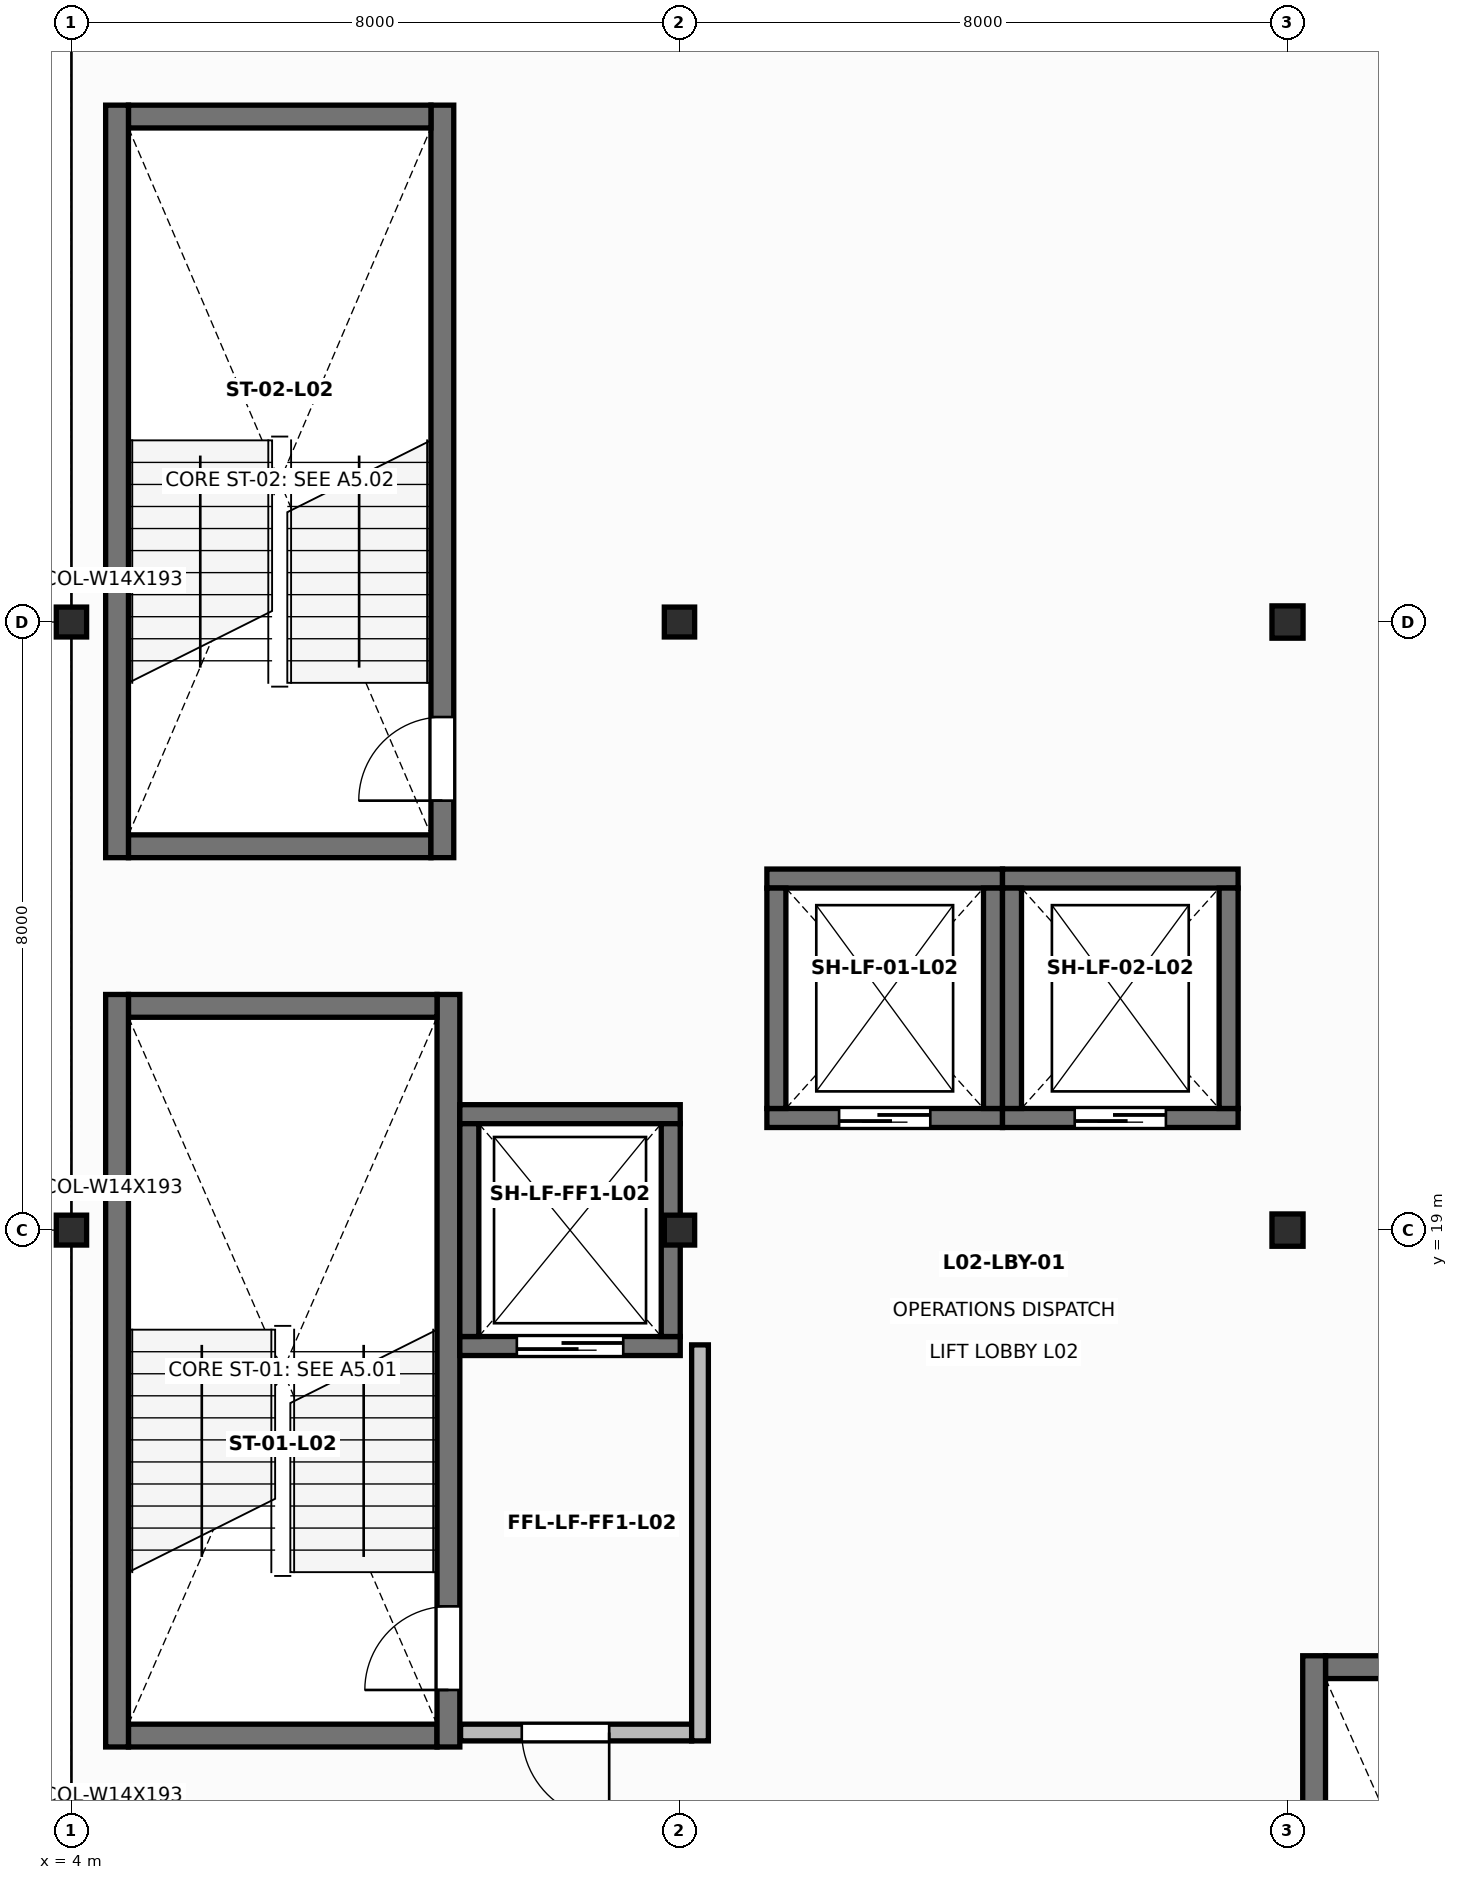
"""IFC4 building model, lengths in metres.
Left out: names, types, materials, properties, quantities, classifications, styles, units other than length and angle.
Written with IfcOpenShell. Run it as: python <this file> out.ifc"""

import sys

from ifc_helpers import new_model, si_unit, direction, frame, frame_2d, origin, origin_2d, place, context, subcontext, project, spatial, rectangle, i_section, extrude, element, fill, save


model = new_model("IFC4")
c1 = context("Model", 3, precision=1e-05, world=origin(), true_north=direction((0.0, 1.0)))
c2 = subcontext(c1, "Body", "Model", "MODEL_VIEW")
j1 = project(units=[si_unit("LENGTHUNIT", "METRE"), si_unit("PLANEANGLEUNIT", "RADIAN")], contexts=[c1])
p1 = place(None, origin())
s1 = spatial("IfcSite", under=j1, at=p1, CompositionType="ELEMENT")
p2 = place(p1, origin())
s2 = spatial("IfcBuilding", under=s1, at=p2, CompositionType="ELEMENT")
p3 = place(p2, frame((0.0, 0.0, 11.2)))
s3 = spatial("IfcBuildingStorey", under=s2, at=p3, CompositionType="ELEMENT", Elevation=11.2)
for number, where, z_axis, x_axis in (
    (1, (4.0, 19.0, 0.0), (0.0, 0.0, 1.0), (1.0, 0.0, 0.0)),
    (2, (4.0, 27.0, 0.0), (0.0, 0.0, 1.0), (1.0, 0.0, 0.0)),
    (3, (12.0, 19.0, 0.0), (0.0, 0.0, 1.0), (1.0, 0.0, 0.0)),
    (4, (12.0, 27.0, 0.0), (0.0, 0.0, 1.0), (1.0, 0.0, 0.0)),
):
    element("IfcColumn", number, at=place(p3, frame(where, z_axis=z_axis, x_axis=x_axis)), inside=s3, PredefinedType="COLUMN", context=c2, shape_type="SweptSolid", body=[
        extrude(i_section(OverallWidth=0.399, OverallDepth=0.393, WebThickness=0.023, FlangeThickness=0.037, at=origin_2d()), origin(), (0.0, 0.0, 1.0), 4.4),
    ])
for number, where, z_axis, x_axis in (
    (5, (20.0, 19.0, 0.0), (0.0, 0.0, 1.0), (1.0, 0.0, 0.0)),
    (6, (20.0, 27.0, 0.0), (0.0, 0.0, 1.0), (1.0, 0.0, 0.0)),
):
    element("IfcColumn", number, at=place(p3, frame(where, z_axis=z_axis, x_axis=x_axis)), inside=s3, PredefinedType="COLUMN", context=c2, shape_type="SweptSolid", body=[
        extrude(i_section(OverallWidth=0.409, OverallDepth=0.425, WebThickness=0.033, FlangeThickness=0.052, at=origin_2d()), origin(), (0.0, 0.0, 1.0), 4.4),
    ])
p4 = place(p3, frame((4.75, 12.35, 0.0), z_axis=(0.0, 0.0, 1.0), x_axis=(1.0, 0.0, 0.0)))
e7 = element("IfcWall", 7, at=p4, inside=s3, PredefinedType="SHEAR", context=c2, shape_type="SweptSolid", body=[
    extrude(rectangle(XDim=4.06, YDim=0.3, at=frame_2d((2.03, 0.0))), origin(), (0.0, 0.0, 1.0), 4.165),
])
p5 = place(p3, frame((8.96, 12.2, 0.0), z_axis=(0.0, 0.0, 1.0), x_axis=(0.0, 1.0, 0.0)))
e8 = element("IfcWall", 8, at=p5, inside=s3, PredefinedType="SHEAR", context=c2, shape_type="SweptSolid", body=[
    extrude(rectangle(XDim=9.9, YDim=0.3, at=frame_2d((4.95, 0.0))), origin(), (0.0, 0.0, 1.0), 4.165),
])
p6 = place(p5, frame((0.75, 0.0, 0.0)))
e9 = element("IfcOpeningElement", 9, at=p6, cuts=e8, PredefinedType="OPENING", context=c2, shape_type="SweptSolid", body=[
    extrude(rectangle(XDim=1.1, YDim=2.15, at=frame_2d((0.55, 1.075))), frame((0.0, 0.16, 0.0), z_axis=(0.0, -1.0, 0.0), x_axis=(1.0, 0.0, 0.0)), (0.0, 0.0, 1.0), 0.32),
])
p7 = place(p3, frame((8.81, 21.95, 0.0), z_axis=(0.0, 0.0, 1.0), x_axis=(-1.0, 0.0, 0.0)))
e10 = element("IfcWall", 10, at=p7, inside=s3, PredefinedType="SHEAR", context=c2, shape_type="SweptSolid", body=[
    extrude(rectangle(XDim=4.06, YDim=0.3, at=frame_2d((2.03, 0.0))), origin(), (0.0, 0.0, 1.0), 4.165),
])
p8 = place(p3, frame((4.6, 22.1, 0.0), z_axis=(0.0, 0.0, 1.0), x_axis=(0.0, -1.0, 0.0)))
e11 = element("IfcWall", 11, at=p8, inside=s3, PredefinedType="SHEAR", context=c2, shape_type="SweptSolid", body=[
    extrude(rectangle(XDim=9.9, YDim=0.3, at=frame_2d((4.95, 0.0))), origin(), (0.0, 0.0, 1.0), 4.165),
])
p9 = place(p3, frame((4.75, 24.05, 0.0), z_axis=(0.0, 0.0, 1.0), x_axis=(1.0, 0.0, 0.0)))
e12 = element("IfcWall", 12, at=p9, inside=s3, PredefinedType="SHEAR", context=c2, shape_type="SweptSolid", body=[
    extrude(rectangle(XDim=3.98, YDim=0.3, at=frame_2d((1.99, 0.0))), origin(), (0.0, 0.0, 1.0), 4.165),
])
p10 = place(p3, frame((8.88, 23.9, 0.0), z_axis=(0.0, 0.0, 1.0), x_axis=(0.0, 1.0, 0.0)))
e13 = element("IfcWall", 13, at=p10, inside=s3, PredefinedType="SHEAR", context=c2, shape_type="SweptSolid", body=[
    extrude(rectangle(XDim=9.9, YDim=0.3, at=frame_2d((4.95, 0.0))), origin(), (0.0, 0.0, 1.0), 4.165),
])
p11 = place(p10, frame((0.75, 0.0, 0.0)))
e14 = element("IfcOpeningElement", 14, at=p11, cuts=e13, PredefinedType="OPENING", context=c2, shape_type="SweptSolid", body=[
    extrude(rectangle(XDim=1.1, YDim=2.15, at=frame_2d((0.55, 1.075))), frame((0.0, 0.16, 0.0), z_axis=(0.0, -1.0, 0.0), x_axis=(1.0, 0.0, 0.0)), (0.0, 0.0, 1.0), 0.32),
])
p12 = place(p3, frame((8.73, 33.65, 0.0), z_axis=(0.0, 0.0, 1.0), x_axis=(-1.0, 0.0, 0.0)))
e15 = element("IfcWall", 15, at=p12, inside=s3, PredefinedType="SHEAR", context=c2, shape_type="SweptSolid", body=[
    extrude(rectangle(XDim=3.98, YDim=0.3, at=frame_2d((1.99, 0.0))), origin(), (0.0, 0.0, 1.0), 4.165),
])
p13 = place(p3, frame((4.6, 33.8, 0.0), z_axis=(0.0, 0.0, 1.0), x_axis=(0.0, -1.0, 0.0)))
e16 = element("IfcWall", 16, at=p13, inside=s3, PredefinedType="SHEAR", context=c2, shape_type="SweptSolid", body=[
    extrude(rectangle(XDim=9.9, YDim=0.3, at=frame_2d((4.95, 0.0))), origin(), (0.0, 0.0, 1.0), 4.165),
])
p14 = place(p3, frame((24.66, 13.25, 0.0), z_axis=(0.0, 0.0, 1.0), x_axis=(-1.0, 0.0, 0.0)))
e17 = element("IfcWall", 17, at=p14, inside=s3, PredefinedType="SHEAR", context=c2, shape_type="SweptSolid", body=[
    extrude(rectangle(XDim=4.16, YDim=0.3, at=frame_2d((2.08, 0.0))), origin(), (0.0, 0.0, 1.0), 4.165),
])
p15 = place(p3, frame((20.35, 13.4, 0.0), z_axis=(0.0, 0.0, 1.0), x_axis=(0.0, -1.0, 0.0)))
e18 = element("IfcWall", 18, at=p15, inside=s3, PredefinedType="SHEAR", context=c2, shape_type="SweptSolid", body=[
    extrude(rectangle(XDim=10.0, YDim=0.3, at=frame_2d((5.0, 0.0))), origin(), (0.0, 0.0, 1.0), 4.165),
])
p16 = place(p3, frame((9.11, 17.475, 0.0), z_axis=(0.0, 0.0, 1.0), x_axis=(1.0, 0.0, 0.0)))
e19 = element("IfcWall", 19, at=p16, inside=s3, PredefinedType="SOLIDWALL", context=c2, shape_type="SweptSolid", body=[
    extrude(rectangle(XDim=2.9, YDim=0.25, at=frame_2d((1.45, 0.0))), origin(), (0.0, 0.0, 1.0), 4.165),
])
p17 = place(p16, frame((0.75, 0.0, 0.0)))
e20 = element("IfcOpeningElement", 20, at=p17, cuts=e19, PredefinedType="OPENING", context=c2, shape_type="SweptSolid", body=[
    extrude(rectangle(XDim=1.4, YDim=2.25, at=frame_2d((0.7, 1.125))), frame((0.0, 0.135, 0.0), z_axis=(0.0, -1.0, 0.0), x_axis=(1.0, 0.0, 0.0)), (0.0, 0.0, 1.0), 0.27),
])
p18 = place(p3, frame((12.01, 20.525, 0.0), z_axis=(0.0, 0.0, 1.0), x_axis=(-1.0, 0.0, 0.0)))
e21 = element("IfcWall", 21, at=p18, inside=s3, PredefinedType="SOLIDWALL", context=c2, shape_type="SweptSolid", body=[
    extrude(rectangle(XDim=2.9, YDim=0.25, at=frame_2d((1.45, 0.0))), origin(), (0.0, 0.0, 1.0), 4.165),
])
for number, where, z_axis, x_axis in (
    (22, (11.885, 17.6, 0.0), (0.0, 0.0, 1.0), (0.0, 1.0, 0.0)),
    (23, (9.235, 20.4, 0.0), (0.0, 0.0, 1.0), (0.0, -1.0, 0.0)),
):
    element("IfcWall", number, at=place(p3, frame(where, z_axis=z_axis, x_axis=x_axis)), inside=s3, PredefinedType="SOLIDWALL", context=c2, shape_type="SweptSolid", body=[
        extrude(rectangle(XDim=2.8, YDim=0.25, at=frame_2d((1.4, 0.0))), origin(), (0.0, 0.0, 1.0), 4.165),
    ])
p19 = place(p3, frame((9.12, 12.39, 0.0), z_axis=(0.0, 0.0, 1.0), x_axis=(1.0, 0.0, 0.0)))
e24 = element("IfcWall", 24, at=p19, inside=s3, PredefinedType="SOLIDWALL", context=c2, shape_type="SweptSolid", body=[
    extrude(rectangle(XDim=3.04, YDim=0.22, at=frame_2d((1.52, 0.0))), origin(), (0.0, 0.0, 1.0), 3.547),
])
p20 = place(p19, frame((0.805, 0.0, 0.0)))
e25 = element("IfcOpeningElement", 25, at=p20, cuts=e24, PredefinedType="OPENING", context=c2, shape_type="SweptSolid", body=[
    extrude(rectangle(XDim=1.15, YDim=2.15, at=frame_2d((0.575, 1.075))), frame((0.0, 0.12, 0.0), z_axis=(0.0, -1.0, 0.0), x_axis=(1.0, 0.0, 0.0)), (0.0, 0.0, 1.0), 0.24),
])
p21 = place(p3, frame((12.27, 12.28, 0.0), z_axis=(0.0, 0.0, 1.0), x_axis=(0.0, 1.0, 0.0)))
e26 = element("IfcWall", 26, at=p21, inside=s3, PredefinedType="SOLIDWALL", context=c2, shape_type="SweptSolid", body=[
    extrude(rectangle(XDim=5.21, YDim=0.22, at=frame_2d((2.605, 0.0))), origin(), (0.0, 0.0, 1.0), 4.165),
])
p22 = place(p3, frame((13.15, 20.475, 0.0), z_axis=(0.0, 0.0, 1.0), x_axis=(1.0, 0.0, 0.0)))
e27 = element("IfcWall", 27, at=p22, inside=s3, PredefinedType="SOLIDWALL", context=c2, shape_type="SweptSolid", body=[
    extrude(rectangle(XDim=3.1, YDim=0.25, at=frame_2d((1.55, 0.0))), origin(), (0.0, 0.0, 1.0), 4.165),
])
p23 = place(p22, frame((0.95, 0.0, 0.0)))
e28 = element("IfcOpeningElement", 28, at=p23, cuts=e27, PredefinedType="OPENING", context=c2, shape_type="SweptSolid", body=[
    extrude(rectangle(XDim=1.2, YDim=2.2, at=frame_2d((0.6, 1.1))), frame((0.0, 0.135, 0.0), z_axis=(0.0, -1.0, 0.0), x_axis=(1.0, 0.0, 0.0)), (0.0, 0.0, 1.0), 0.27),
])
p24 = place(p3, frame((16.25, 23.625, 0.0), z_axis=(0.0, 0.0, 1.0), x_axis=(-1.0, 0.0, 0.0)))
e29 = element("IfcWall", 29, at=p24, inside=s3, PredefinedType="SOLIDWALL", context=c2, shape_type="SweptSolid", body=[
    extrude(rectangle(XDim=3.1, YDim=0.25, at=frame_2d((1.55, 0.0))), origin(), (0.0, 0.0, 1.0), 4.165),
])
for number, where, z_axis, x_axis in (
    (30, (16.125, 20.6, 0.0), (0.0, 0.0, 1.0), (0.0, 1.0, 0.0)),
    (31, (13.275, 23.5, 0.0), (0.0, 0.0, 1.0), (0.0, -1.0, 0.0)),
):
    element("IfcWall", number, at=place(p3, frame(where, z_axis=z_axis, x_axis=x_axis)), inside=s3, PredefinedType="SOLIDWALL", context=c2, shape_type="SweptSolid", body=[
        extrude(rectangle(XDim=2.9, YDim=0.25, at=frame_2d((1.45, 0.0))), origin(), (0.0, 0.0, 1.0), 4.165),
    ])
p25 = place(p3, frame((16.25, 20.475, 0.0), z_axis=(0.0, 0.0, 1.0), x_axis=(1.0, 0.0, 0.0)))
e32 = element("IfcWall", 32, at=p25, inside=s3, PredefinedType="SOLIDWALL", context=c2, shape_type="SweptSolid", body=[
    extrude(rectangle(XDim=3.1, YDim=0.25, at=frame_2d((1.55, 0.0))), origin(), (0.0, 0.0, 1.0), 4.165),
])
p26 = place(p25, frame((0.95, 0.0, 0.0)))
e33 = element("IfcOpeningElement", 33, at=p26, cuts=e32, PredefinedType="OPENING", context=c2, shape_type="SweptSolid", body=[
    extrude(rectangle(XDim=1.2, YDim=2.2, at=frame_2d((0.6, 1.1))), frame((0.0, 0.135, 0.0), z_axis=(0.0, -1.0, 0.0), x_axis=(1.0, 0.0, 0.0)), (0.0, 0.0, 1.0), 0.27),
])
p27 = place(p3, frame((19.35, 23.625, 0.0), z_axis=(0.0, 0.0, 1.0), x_axis=(-1.0, 0.0, 0.0)))
e34 = element("IfcWall", 34, at=p27, inside=s3, PredefinedType="SOLIDWALL", context=c2, shape_type="SweptSolid", body=[
    extrude(rectangle(XDim=3.1, YDim=0.25, at=frame_2d((1.55, 0.0))), origin(), (0.0, 0.0, 1.0), 4.165),
])
for number, where, z_axis, x_axis in (
    (35, (19.225, 20.6, 0.0), (0.0, 0.0, 1.0), (0.0, 1.0, 0.0)),
    (36, (16.375, 23.5, 0.0), (0.0, 0.0, 1.0), (0.0, -1.0, 0.0)),
):
    element("IfcWall", number, at=place(p3, frame(where, z_axis=z_axis, x_axis=x_axis)), inside=s3, PredefinedType="SOLIDWALL", context=c2, shape_type="SweptSolid", body=[
        extrude(rectangle(XDim=2.9, YDim=0.25, at=frame_2d((1.45, 0.0))), origin(), (0.0, 0.0, 1.0), 4.165),
    ])
p28 = place(p6, origin())
e37 = element("IfcDoor", 37, at=p28, inside=s3, OperationType="SINGLE_SWING_LEFT", PredefinedType="DOOR", context=c2, shape_type="SweptSolid", body=[
    extrude(rectangle(XDim=1.1, YDim=2.15, at=frame_2d((0.55, 1.075))), frame((0.0, 0.025, 0.0), z_axis=(0.0, -1.0, 0.0), x_axis=(1.0, 0.0, 0.0)), (0.0, 0.0, 1.0), 0.05),
])
fill(e9, e37)
p29 = place(p11, origin())
e38 = element("IfcDoor", 38, at=p29, inside=s3, OperationType="SINGLE_SWING_LEFT", PredefinedType="DOOR", context=c2, shape_type="SweptSolid", body=[
    extrude(rectangle(XDim=1.1, YDim=2.15, at=frame_2d((0.55, 1.075))), frame((0.0, 0.025, 0.0), z_axis=(0.0, -1.0, 0.0), x_axis=(1.0, 0.0, 0.0)), (0.0, 0.0, 1.0), 0.05),
])
fill(e14, e38)
p30 = place(p17, frame((1.4, 0.0, 0.0), z_axis=(0.0, 0.0, 1.0), x_axis=(-1.0, 0.0, 0.0)))
e39 = element("IfcDoor", 39, at=p30, inside=s3, OperationType="DOUBLE_DOOR_SLIDING", PredefinedType="DOOR", context=c2, shape_type="SweptSolid", body=[
    extrude(rectangle(XDim=1.4, YDim=2.25, at=frame_2d((0.7, 1.125))), frame((0.0, 0.025, 0.0), z_axis=(0.0, -1.0, 0.0), x_axis=(1.0, 0.0, 0.0)), (0.0, 0.0, 1.0), 0.05),
])
fill(e20, e39)
p31 = place(p20, frame((1.15, 0.0, 0.0), z_axis=(0.0, 0.0, 1.0), x_axis=(-1.0, 0.0, 0.0)))
e40 = element("IfcDoor", 40, at=p31, inside=s3, OperationType="SINGLE_SWING_RIGHT", PredefinedType="DOOR", context=c2, shape_type="SweptSolid", body=[
    extrude(rectangle(XDim=1.15, YDim=2.15, at=frame_2d((0.575, 1.075))), frame((0.0, 0.025, 0.0), z_axis=(0.0, -1.0, 0.0), x_axis=(1.0, 0.0, 0.0)), (0.0, 0.0, 1.0), 0.05),
])
fill(e25, e40)
p32 = place(p23, frame((1.2, 0.0, 0.0), z_axis=(0.0, 0.0, 1.0), x_axis=(-1.0, 0.0, 0.0)))
e41 = element("IfcDoor", 41, at=p32, inside=s3, OperationType="DOUBLE_DOOR_SLIDING", PredefinedType="DOOR", context=c2, shape_type="SweptSolid", body=[
    extrude(rectangle(XDim=1.2, YDim=2.2, at=frame_2d((0.6, 1.1))), frame((0.0, 0.025, 0.0), z_axis=(0.0, -1.0, 0.0), x_axis=(1.0, 0.0, 0.0)), (0.0, 0.0, 1.0), 0.05),
])
fill(e28, e41)
p33 = place(p26, frame((1.2, 0.0, 0.0), z_axis=(0.0, 0.0, 1.0), x_axis=(-1.0, 0.0, 0.0)))
e42 = element("IfcDoor", 42, at=p33, inside=s3, OperationType="DOUBLE_DOOR_SLIDING", PredefinedType="DOOR", context=c2, shape_type="SweptSolid", body=[
    extrude(rectangle(XDim=1.2, YDim=2.2, at=frame_2d((0.6, 1.1))), frame((0.0, 0.025, 0.0), z_axis=(0.0, -1.0, 0.0), x_axis=(1.0, 0.0, 0.0)), (0.0, 0.0, 1.0), 0.05),
])
fill(e33, e42)
save(model, sys.argv[1])
